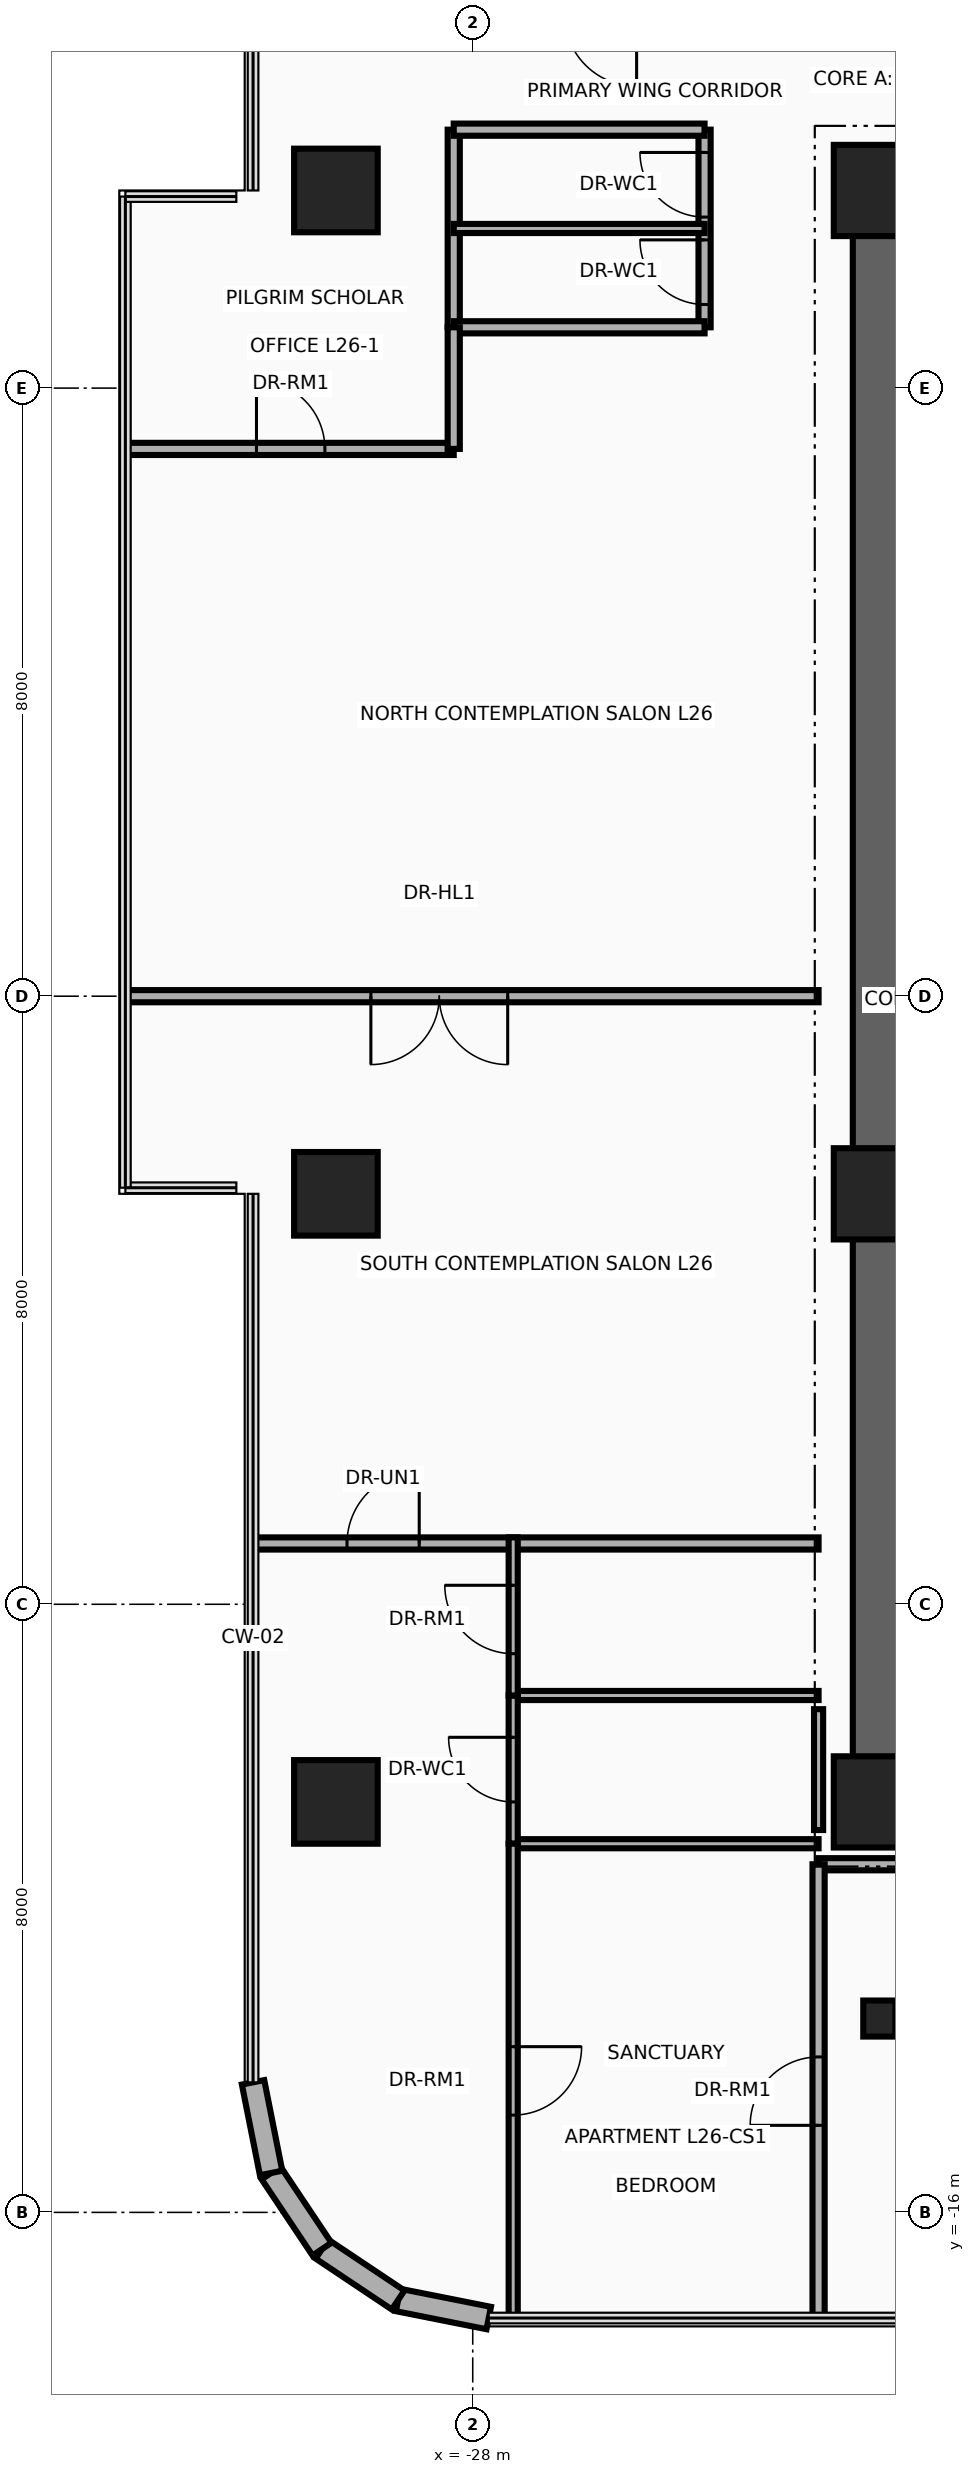
"""IFC4 building model, lengths in metres.
Left out: names, types, materials, properties, quantities, classifications, styles, units other than length and angle.
Written with IfcOpenShell. Run it as: python <this file> out.ifc"""

import sys

from ifc_helpers import new_model, si_unit, direction, frame, frame_2d, origin, origin_2d, place, context, subcontext, project, spatial, rectangle, circle, i_section, extrude, source, transform, mapped, element, fill, save


model = new_model("IFC4")
c1 = context("Model", 3, precision=1e-05, world=origin(), true_north=direction((0.0, 1.0)))
c2 = subcontext(c1, "Body", "Model", "MODEL_VIEW")
j1 = project(units=[si_unit("LENGTHUNIT", "METRE"), si_unit("PLANEANGLEUNIT", "RADIAN")], contexts=[c1])
p1 = place(None, origin())
s1 = spatial("IfcSite", under=j1, at=p1, CompositionType="ELEMENT")
p2 = place(p1, origin())
s2 = spatial("IfcBuilding", under=s1, at=p2, CompositionType="ELEMENT")
p3 = place(p2, frame((0.0, 0.0, 105.7)))
s3 = spatial("IfcBuildingStorey", under=s2, at=p3, CompositionType="ELEMENT", Elevation=105.7)
p4 = place(p3, frame((-22.65, -11.15, 0.0), z_axis=(0.0, 0.0, 1.0), x_axis=(0.0, 1.0, 0.0)))
e1 = element("IfcWall", 1, at=p4, inside=s3, PredefinedType="SHEAR", context=c2, shape_type="SweptSolid", body=[
    extrude(rectangle(XDim=22.3, YDim=0.7, at=frame_2d((11.15, 0.0))), origin(), (0.0, 0.0, 1.0), 3.46),
])
for number, where, z_axis, x_axis in (
    (2, (-22.65, 10.8, 0.0), (0.0, 0.0, 1.0), (1.0, 0.0, 0.0)),
    (3, (-22.65, -10.8, 0.0), (0.0, 0.0, 1.0), (1.0, 0.0, 0.0)),
):
    element("IfcWall", number, at=place(p3, frame(where, z_axis=z_axis, x_axis=x_axis)), inside=s3, PredefinedType="SHEAR", context=c2, shape_type="SweptSolid", body=[
        extrude(rectangle(XDim=10.25, YDim=0.7, at=frame_2d((5.125, 0.0))), origin(), (0.0, 0.0, 1.0), 3.46),
    ])
m1 = source(origin(), c2, "Body", "SweptSolid", [
    extrude(circle(Radius=0.55, at=origin_2d()), origin(), (0.0, 0.0, 1.0), 3.7),
])
p5 = place(p3, frame((-29.8, -10.6, 0.0), z_axis=(0.0, 0.0, 1.0), x_axis=(1.0, 0.0, 0.0)))
e4 = element("IfcColumn", 4, at=p5, inside=s3, PredefinedType="COLUMN", context=c2, shape_type="MappedRepresentation", body=[
    mapped(m1, transform((0.0, 0.0, 0.0), x_axis=(1.0, 0.0, 0.0), y_axis=(0.0, 1.0, 0.0), z_axis=(0.0, 0.0, 1.0), scale=1.0)),
])
m2 = source(origin(), c2, "Body", "SweptSolid", [
    extrude(rectangle(XDim=1.2, YDim=1.2, at=origin_2d()), origin(), (0.0, 0.0, 1.0), 3.7),
])
p6 = place(p3, frame((-22.65, -10.6, 0.0), z_axis=(0.0, 0.0, 1.0), x_axis=(1.0, 0.0, 0.0)))
e5 = element("IfcColumn", 5, at=p6, inside=s3, PredefinedType="COLUMN", context=c2, shape_type="MappedRepresentation", body=[
    mapped(m2, transform((0.0, 0.0, 0.0), x_axis=(1.0, 0.0, 0.0), y_axis=(0.0, 1.0, 0.0), z_axis=(0.0, 0.0, 1.0), scale=1.0)),
])
p7 = place(p3, frame((-29.8, -2.6, 0.0), z_axis=(0.0, 0.0, 1.0), x_axis=(1.0, 0.0, 0.0)))
e6 = element("IfcColumn", 6, at=p7, inside=s3, PredefinedType="COLUMN", context=c2, shape_type="MappedRepresentation", body=[
    mapped(m1, transform((0.0, 0.0, 0.0), x_axis=(1.0, 0.0, 0.0), y_axis=(0.0, 1.0, 0.0), z_axis=(0.0, 0.0, 1.0), scale=1.0)),
])
p8 = place(p3, frame((-22.65, -2.6, 0.0), z_axis=(0.0, 0.0, 1.0), x_axis=(1.0, 0.0, 0.0)))
e7 = element("IfcColumn", 7, at=p8, inside=s3, PredefinedType="COLUMN", context=c2, shape_type="MappedRepresentation", body=[
    mapped(m2, transform((0.0, 0.0, 0.0), x_axis=(1.0, 0.0, 0.0), y_axis=(0.0, 1.0, 0.0), z_axis=(0.0, 0.0, 1.0), scale=1.0)),
])
p9 = place(p3, frame((-29.8, 10.6, 0.0), z_axis=(0.0, 0.0, 1.0), x_axis=(1.0, 0.0, 0.0)))
e8 = element("IfcColumn", 8, at=p9, inside=s3, PredefinedType="COLUMN", context=c2, shape_type="MappedRepresentation", body=[
    mapped(m1, transform((0.0, 0.0, 0.0), x_axis=(1.0, 0.0, 0.0), y_axis=(0.0, 1.0, 0.0), z_axis=(0.0, 0.0, 1.0), scale=1.0)),
])
p10 = place(p3, frame((-22.65, 10.6, 0.0), z_axis=(0.0, 0.0, 1.0), x_axis=(1.0, 0.0, 0.0)))
e9 = element("IfcColumn", 9, at=p10, inside=s3, PredefinedType="COLUMN", context=c2, shape_type="MappedRepresentation", body=[
    mapped(m2, transform((0.0, 0.0, 0.0), x_axis=(1.0, 0.0, 0.0), y_axis=(0.0, 1.0, 0.0), z_axis=(0.0, 0.0, 1.0), scale=1.0)),
])
m3 = source(origin(), c2, "Body", "SweptSolid", [
    extrude(i_section(OverallWidth=0.424, OverallDepth=0.474, WebThickness=0.048, FlangeThickness=0.077, at=origin_2d()), origin(), (0.0, 0.0, 1.0), 3.7),
])
p11 = place(p3, frame((-22.65, -13.45, 0.0), z_axis=(0.0, 0.0, 1.0), x_axis=(1.0, 0.0, 0.0)))
e10 = element("IfcColumn", 10, at=p11, inside=s3, PredefinedType="COLUMN", context=c2, shape_type="MappedRepresentation", body=[
    mapped(m3, transform((0.0, 0.0, 0.0), x_axis=(1.0, 0.0, 0.0), y_axis=(0.0, 1.0, 0.0), z_axis=(0.0, 0.0, 1.0), scale=1.0)),
])
p12 = place(p3, frame((-27.789, -17.39, 0.0), z_axis=(0.0, 0.0, 1.0), x_axis=(-0.980804027463, 0.194996050505, 0.0)))
e11 = element("IfcWall", 11, at=p12, inside=s3, PredefinedType="SOLIDWALL", context=c2, shape_type="SweptSolid", body=[
    extrude(rectangle(XDim=1.216, YDim=0.3, at=frame_2d((0.608, 0.0))), origin(), (0.0, 0.0, 1.0), 3.46),
])
for number, where, z_axis, x_axis in (
    (12, (-28.982, -17.153, 0.0), (0.0, 0.0, 1.0), (-0.831, 0.556, 0.0)),
    (13, (-29.983, -16.483, 0.0), (0.0, 0.0, 1.0), (-0.556, 0.831, 0.0)),
):
    element("IfcWall", number, at=place(p3, frame(where, z_axis=z_axis, x_axis=x_axis)), inside=s3, PredefinedType="SOLIDWALL", context=c2, shape_type="SweptSolid", body=[
        extrude(rectangle(XDim=1.205, YDim=0.3, at=frame_2d((0.603, 0.0))), origin(), (0.0, 0.0, 1.0), 3.46),
    ])
p13 = place(p3, frame((-30.653, -15.482, 0.0), z_axis=(0.0, 0.0, 1.0), x_axis=(-0.194996050505, 0.980804027463, 0.0)))
e14 = element("IfcWall", 14, at=p13, inside=s3, PredefinedType="SOLIDWALL", context=c2, shape_type="SweptSolid", body=[
    extrude(rectangle(XDim=1.216, YDim=0.3, at=frame_2d((0.608, 0.0))), origin(), (0.0, 0.0, 1.0), 3.46),
])
p14 = place(p3, frame((-28.25, 8.8, 0.0), z_axis=(0.0, 0.0, 1.0), x_axis=(0.0, 1.0, 0.0)))
e15 = element("IfcWall", 15, at=p14, inside=s3, PredefinedType="PARTITIONING", context=c2, shape_type="SweptSolid", body=[
    extrude(rectangle(XDim=2.6, YDim=0.16, at=frame_2d((1.3, 0.0))), origin(), (0.0, 0.0, 1.0), 2.666),
])
p15 = place(p3, frame((-24.95, 8.8, 0.0), z_axis=(0.0, 0.0, 1.0), x_axis=(0.0, 1.0, 0.0)))
e16 = element("IfcWall", 16, at=p15, inside=s3, PredefinedType="PARTITIONING", context=c2, shape_type="SweptSolid", body=[
    extrude(rectangle(XDim=2.6, YDim=0.16, at=frame_2d((1.3, 0.0))), origin(), (0.0, 0.0, 1.0), 2.666),
])
p16 = place(p15, frame((0.3, 0.0, 0.0)))
e17 = element("IfcOpeningElement", 17, at=p16, cuts=e16, PredefinedType="OPENING", context=c2, shape_type="SweptSolid", body=[
    extrude(rectangle(XDim=0.85, YDim=2.1, at=frame_2d((0.425, 1.05))), frame((0.0, 0.095, 0.0), z_axis=(0.0, -1.0, 0.0), x_axis=(1.0, 0.0, 0.0)), (0.0, 0.0, 1.0), 0.19),
])
p17 = place(p15, frame((1.45, 0.0, 0.0)))
e18 = element("IfcOpeningElement", 18, at=p17, cuts=e16, PredefinedType="OPENING", context=c2, shape_type="SweptSolid", body=[
    extrude(rectangle(XDim=0.85, YDim=2.1, at=frame_2d((0.425, 1.05))), frame((0.0, 0.095, 0.0), z_axis=(0.0, -1.0, 0.0), x_axis=(1.0, 0.0, 0.0)), (0.0, 0.0, 1.0), 0.19),
])
for number, where, z_axis, x_axis in (
    (19, (-28.25, 8.8, 0.0), (0.0, 0.0, 1.0), (1.0, 0.0, 0.0)),
    (20, (-28.25, 11.4, 0.0), (0.0, 0.0, 1.0), (1.0, 0.0, 0.0)),
):
    element("IfcWall", number, at=place(p3, frame(where, z_axis=z_axis, x_axis=x_axis)), inside=s3, PredefinedType="PARTITIONING", context=c2, shape_type="SweptSolid", body=[
        extrude(rectangle(XDim=3.3, YDim=0.16, at=frame_2d((1.65, 0.0))), origin(), (0.0, 0.0, 1.0), 3.46),
    ])
p18 = place(p3, frame((-28.25, 10.1, 0.0), z_axis=(0.0, 0.0, 1.0), x_axis=(1.0, 0.0, 0.0)))
e21 = element("IfcWall", 21, at=p18, inside=s3, PredefinedType="PARTITIONING", context=c2, shape_type="SweptSolid", body=[
    extrude(rectangle(XDim=3.3, YDim=0.12, at=frame_2d((1.65, 0.0))), origin(), (0.0, 0.0, 1.0), 3.46),
])
p19 = place(p3, frame((-23.45, -11.42, 0.0), z_axis=(0.0, 0.0, 1.0), x_axis=(1.0, 0.0, 0.0)))
e22 = element("IfcWall", 22, at=p19, inside=s3, PredefinedType="PARTITIONING", context=c2, shape_type="SweptSolid", body=[
    extrude(rectangle(XDim=13.84, YDim=0.16, at=frame_2d((6.92, 0.0))), origin(), (0.0, 0.0, 1.0), 2.834),
])
p20 = place(p3, frame((-23.45, -17.39, 0.0), z_axis=(0.0, 0.0, 1.0), x_axis=(0.0, 1.0, 0.0)))
e23 = element("IfcWall", 23, at=p20, inside=s3, PredefinedType="PARTITIONING", context=c2, shape_type="SweptSolid", body=[
    extrude(rectangle(XDim=5.97, YDim=0.16, at=frame_2d((2.985, 0.0))), origin(), (0.0, 0.0, 1.0), 3.46),
])
p21 = place(p20, frame((2.535, 0.0, 0.0)))
e24 = element("IfcOpeningElement", 24, at=p21, cuts=e23, PredefinedType="OPENING", context=c2, shape_type="SweptSolid", body=[
    extrude(rectangle(XDim=0.9, YDim=2.1, at=frame_2d((0.45, 1.05))), frame((0.0, 0.095, 0.0), z_axis=(0.0, -1.0, 0.0), x_axis=(1.0, 0.0, 0.0)), (0.0, 0.0, 1.0), 0.19),
])
p22 = place(p3, frame((-30.89, -7.2, 0.0), z_axis=(0.0, 0.0, 1.0), x_axis=(1.0, 0.0, 0.0)))
e25 = element("IfcWall", 25, at=p22, inside=s3, PredefinedType="PARTITIONING", context=c2, shape_type="SweptSolid", body=[
    extrude(rectangle(XDim=7.44, YDim=0.16, at=frame_2d((3.72, 0.0))), origin(), (0.0, 0.0, 1.0), 2.896),
])
p23 = place(p22, frame((1.236, 0.0, 0.0)))
e26 = element("IfcOpeningElement", 26, at=p23, cuts=e25, PredefinedType="OPENING", context=c2, shape_type="SweptSolid", body=[
    extrude(rectangle(XDim=0.95, YDim=2.15, at=frame_2d((0.475, 1.075))), frame((0.0, 0.095, 0.0), z_axis=(0.0, -1.0, 0.0), x_axis=(1.0, 0.0, 0.0)), (0.0, 0.0, 1.0), 0.19),
])
p24 = place(p3, frame((-32.54, 7.2, 0.0), z_axis=(0.0, 0.0, 1.0), x_axis=(1.0, 0.0, 0.0)))
e27 = element("IfcWall", 27, at=p24, inside=s3, PredefinedType="PARTITIONING", context=c2, shape_type="SweptSolid", body=[
    extrude(rectangle(XDim=4.29, YDim=0.16, at=frame_2d((2.145, 0.0))), origin(), (0.0, 0.0, 1.0), 2.896),
])
p25 = place(p24, frame((1.695, 0.0, 0.0)))
e28 = element("IfcOpeningElement", 28, at=p25, cuts=e27, PredefinedType="OPENING", context=c2, shape_type="SweptSolid", body=[
    extrude(rectangle(XDim=0.9, YDim=2.1, at=frame_2d((0.45, 1.05))), frame((0.0, 0.095, 0.0), z_axis=(0.0, -1.0, 0.0), x_axis=(1.0, 0.0, 0.0)), (0.0, 0.0, 1.0), 0.19),
])
p26 = place(p3, frame((-28.25, 7.2, 0.0), z_axis=(0.0, 0.0, 1.0), x_axis=(0.0, 1.0, 0.0)))
e29 = element("IfcWall", 29, at=p26, inside=s3, PredefinedType="PARTITIONING", context=c2, shape_type="SweptSolid", body=[
    extrude(rectangle(XDim=1.6, YDim=0.16, at=frame_2d((0.8, 0.0))), origin(), (0.0, 0.0, 1.0), 2.988),
])
p27 = place(p3, frame((-27.468, -9.2, 0.0), z_axis=(0.0, 0.0, 1.0), x_axis=(1.0, 0.0, 0.0)))
e30 = element("IfcWall", 30, at=p27, inside=s3, PredefinedType="PARTITIONING", context=c2, shape_type="SweptSolid", body=[
    extrude(rectangle(XDim=4.018, YDim=0.12, at=frame_2d((2.009, 0.0))), origin(), (0.0, 0.0, 1.0), 2.988),
])
p28 = place(p3, frame((-27.468, -11.15, 0.0), z_axis=(0.0, 0.0, 1.0), x_axis=(1.0, 0.0, 0.0)))
e31 = element("IfcWall", 31, at=p28, inside=s3, PredefinedType="PARTITIONING", context=c2, shape_type="SweptSolid", body=[
    extrude(rectangle(XDim=4.018, YDim=0.12, at=frame_2d((2.009, 0.0))), origin(), (0.0, 0.0, 1.0), 3.46),
])
p29 = place(p3, frame((-27.468, -11.15, 0.0), z_axis=(0.0, 0.0, 1.0), x_axis=(0.0, 1.0, 0.0)))
e32 = element("IfcWall", 32, at=p29, inside=s3, PredefinedType="PARTITIONING", context=c2, shape_type="SweptSolid", body=[
    extrude(rectangle(XDim=1.95, YDim=0.12, at=frame_2d((0.975, 0.0))), origin(), (0.0, 0.0, 1.0), 2.666),
])
p30 = place(p29, frame((0.55, 0.0, 0.0)))
e33 = element("IfcOpeningElement", 33, at=p30, cuts=e32, PredefinedType="OPENING", context=c2, shape_type="SweptSolid", body=[
    extrude(rectangle(XDim=0.85, YDim=2.1, at=frame_2d((0.425, 1.05))), frame((0.0, 0.075, 0.0), z_axis=(0.0, -1.0, 0.0), x_axis=(1.0, 0.0, 0.0)), (0.0, 0.0, 1.0), 0.15),
])
p31 = place(p3, frame((-27.468, -9.2, 0.0), z_axis=(0.0, 0.0, 1.0), x_axis=(0.0, 1.0, 0.0)))
e34 = element("IfcWall", 34, at=p31, inside=s3, PredefinedType="PARTITIONING", context=c2, shape_type="SweptSolid", body=[
    extrude(rectangle(XDim=2.08, YDim=0.12, at=frame_2d((1.04, 0.0))), origin(), (0.0, 0.0, 1.0), 2.988),
])
p32 = place(p31, frame((0.55, 0.0, 0.0)))
e35 = element("IfcOpeningElement", 35, at=p32, cuts=e34, PredefinedType="OPENING", context=c2, shape_type="SweptSolid", body=[
    extrude(rectangle(XDim=0.9, YDim=2.1, at=frame_2d((0.45, 1.05))), frame((0.0, 0.075, 0.0), z_axis=(0.0, -1.0, 0.0), x_axis=(1.0, 0.0, 0.0)), (0.0, 0.0, 1.0), 0.15),
])
p33 = place(p3, frame((-27.468, -17.39, 0.0), z_axis=(0.0, 0.0, 1.0), x_axis=(0.0, 1.0, 0.0)))
e36 = element("IfcWall", 36, at=p33, inside=s3, PredefinedType="PARTITIONING", context=c2, shape_type="SweptSolid", body=[
    extrude(rectangle(XDim=6.24, YDim=0.12, at=frame_2d((3.12, 0.0))), origin(), (0.0, 0.0, 1.0), 3.46),
])
p34 = place(p33, frame((2.67, 0.0, 0.0)))
e37 = element("IfcOpeningElement", 37, at=p34, cuts=e36, PredefinedType="OPENING", context=c2, shape_type="SweptSolid", body=[
    extrude(rectangle(XDim=0.9, YDim=2.1, at=frame_2d((0.45, 1.05))), frame((0.0, 0.075, 0.0), z_axis=(0.0, -1.0, 0.0), x_axis=(1.0, 0.0, 0.0)), (0.0, 0.0, 1.0), 0.15),
])
p35 = place(p3, frame((-23.45, -10.97, 0.0), z_axis=(0.0, 0.0, 1.0), x_axis=(0.0, 1.0, 0.0)))
e38 = element("IfcWall", 38, at=p35, inside=s3, PredefinedType="PARTITIONING", context=c2, shape_type="SweptSolid", body=[
    extrude(rectangle(XDim=1.59, YDim=0.12, at=frame_2d((0.795, 0.0))), origin(), (0.0, 0.0, 1.0), 2.666),
])
p36 = place(p3, frame((-32.54, 0.0, 0.0), z_axis=(0.0, 0.0, 1.0), x_axis=(1.0, 0.0, 0.0)))
e39 = element("IfcWall", 39, at=p36, inside=s3, PredefinedType="PARTITIONING", context=c2, shape_type="SweptSolid", body=[
    extrude(rectangle(XDim=9.09, YDim=0.16, at=frame_2d((4.545, 0.0))), origin(), (0.0, 0.0, 1.0), 2.896),
])
p37 = place(p36, frame((3.2, 0.0, 0.0)))
e40 = element("IfcOpeningElement", 40, at=p37, cuts=e39, PredefinedType="OPENING", context=c2, shape_type="SweptSolid", body=[
    extrude(rectangle(XDim=1.8, YDim=2.15, at=frame_2d((0.9, 1.075))), frame((0.0, 0.095, 0.0), z_axis=(0.0, -1.0, 0.0), x_axis=(1.0, 0.0, 0.0)), (0.0, 0.0, 1.0), 0.19),
])
p38 = place(p16, origin())
e41 = element("IfcDoor", 41, at=p38, inside=s3, OperationType="SINGLE_SWING_RIGHT", PredefinedType="DOOR", context=c2, shape_type="SweptSolid", body=[
    extrude(rectangle(XDim=0.85, YDim=2.1, at=frame_2d((0.425, 1.05))), frame((0.0, 0.025, 0.0), z_axis=(0.0, -1.0, 0.0), x_axis=(1.0, 0.0, 0.0)), (0.0, 0.0, 1.0), 0.05),
])
fill(e17, e41)
p39 = place(p17, origin())
e42 = element("IfcDoor", 42, at=p39, inside=s3, OperationType="SINGLE_SWING_LEFT", PredefinedType="DOOR", context=c2, shape_type="SweptSolid", body=[
    extrude(rectangle(XDim=0.85, YDim=2.1, at=frame_2d((0.425, 1.05))), frame((0.0, 0.025, 0.0), z_axis=(0.0, -1.0, 0.0), x_axis=(1.0, 0.0, 0.0)), (0.0, 0.0, 1.0), 0.05),
])
fill(e18, e42)
p40 = place(p23, origin())
e43 = element("IfcDoor", 43, at=p40, inside=s3, OperationType="SINGLE_SWING_RIGHT", PredefinedType="DOOR", context=c2, shape_type="SweptSolid", body=[
    extrude(rectangle(XDim=0.95, YDim=2.15, at=frame_2d((0.475, 1.075))), frame((0.0, 0.025, 0.0), z_axis=(0.0, -1.0, 0.0), x_axis=(1.0, 0.0, 0.0)), (0.0, 0.0, 1.0), 0.05),
])
fill(e26, e43)
p41 = place(p30, origin())
e44 = element("IfcDoor", 44, at=p41, inside=s3, OperationType="SINGLE_SWING_LEFT", PredefinedType="DOOR", context=c2, shape_type="SweptSolid", body=[
    extrude(rectangle(XDim=0.85, YDim=2.1, at=frame_2d((0.425, 1.05))), frame((0.0, 0.025, 0.0), z_axis=(0.0, -1.0, 0.0), x_axis=(1.0, 0.0, 0.0)), (0.0, 0.0, 1.0), 0.05),
])
fill(e33, e44)
p42 = place(p32, origin())
e45 = element("IfcDoor", 45, at=p42, inside=s3, OperationType="SINGLE_SWING_RIGHT", PredefinedType="DOOR", context=c2, shape_type="SweptSolid", body=[
    extrude(rectangle(XDim=0.9, YDim=2.1, at=frame_2d((0.45, 1.05))), frame((0.0, 0.025, 0.0), z_axis=(0.0, -1.0, 0.0), x_axis=(1.0, 0.0, 0.0)), (0.0, 0.0, 1.0), 0.05),
])
fill(e35, e45)
p43 = place(p34, frame((0.9, 0.0, 0.0), z_axis=(0.0, 0.0, 1.0), x_axis=(-1.0, 0.0, 0.0)))
e46 = element("IfcDoor", 46, at=p43, inside=s3, OperationType="SINGLE_SWING_LEFT", PredefinedType="DOOR", context=c2, shape_type="SweptSolid", body=[
    extrude(rectangle(XDim=0.9, YDim=2.1, at=frame_2d((0.45, 1.05))), frame((0.0, 0.025, 0.0), z_axis=(0.0, -1.0, 0.0), x_axis=(1.0, 0.0, 0.0)), (0.0, 0.0, 1.0), 0.05),
])
fill(e37, e46)
p44 = place(p25, origin())
e47 = element("IfcDoor", 47, at=p44, inside=s3, OperationType="SINGLE_SWING_RIGHT", PredefinedType="DOOR", context=c2, shape_type="SweptSolid", body=[
    extrude(rectangle(XDim=0.9, YDim=2.1, at=frame_2d((0.45, 1.05))), frame((0.0, 0.025, 0.0), z_axis=(0.0, -1.0, 0.0), x_axis=(1.0, 0.0, 0.0)), (0.0, 0.0, 1.0), 0.05),
])
fill(e28, e47)
p45 = place(p37, frame((1.8, 0.0, 0.0), z_axis=(0.0, 0.0, 1.0), x_axis=(-1.0, 0.0, 0.0)))
e48 = element("IfcDoor", 48, at=p45, inside=s3, OperationType="DOUBLE_DOOR_SINGLE_SWING", PredefinedType="DOOR", context=c2, shape_type="SweptSolid", body=[
    extrude(rectangle(XDim=1.8, YDim=2.15, at=frame_2d((0.9, 1.075))), frame((0.0, 0.025, 0.0), z_axis=(0.0, -1.0, 0.0), x_axis=(1.0, 0.0, 0.0)), (0.0, 0.0, 1.0), 0.05),
])
fill(e40, e48)
p46 = place(p21, origin())
e49 = element("IfcDoor", 49, at=p46, inside=s3, OperationType="SINGLE_SWING_RIGHT", PredefinedType="DOOR", context=c2, shape_type="SweptSolid", body=[
    extrude(rectangle(XDim=0.9, YDim=2.1, at=frame_2d((0.45, 1.05))), frame((0.0, 0.025, 0.0), z_axis=(0.0, -1.0, 0.0), x_axis=(1.0, 0.0, 0.0)), (0.0, 0.0, 1.0), 0.05),
])
fill(e24, e49)
save(model, sys.argv[1])
